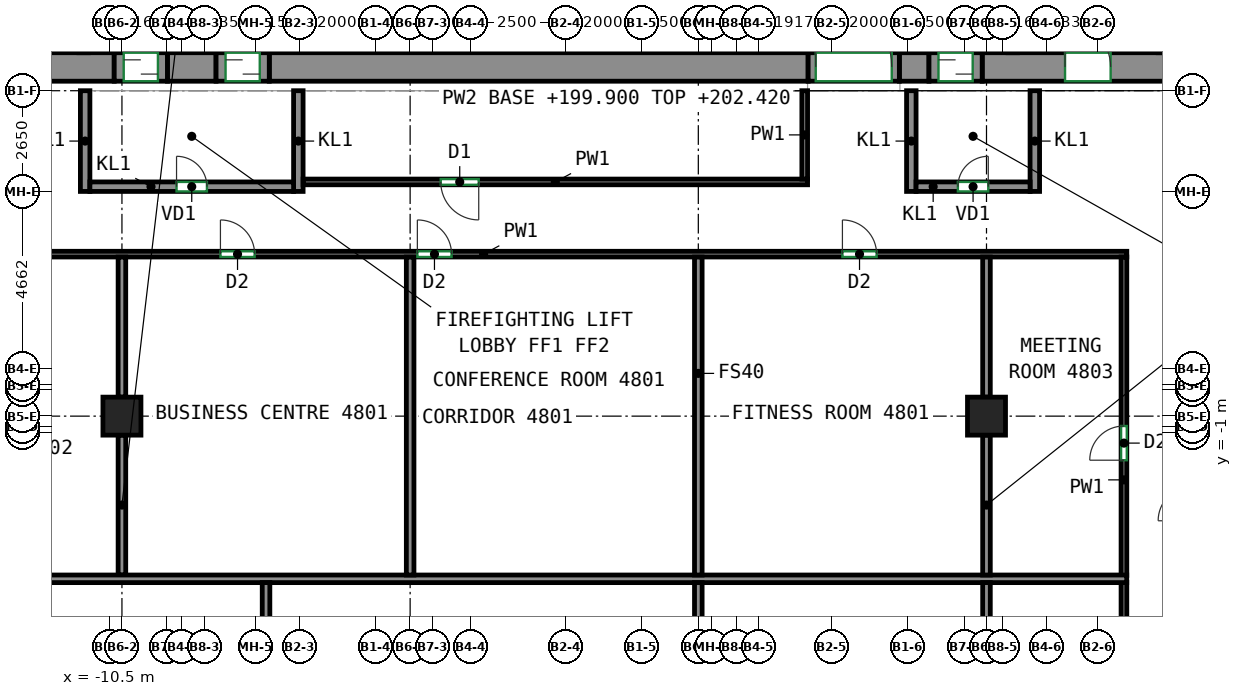
"""IFC4 building model, lengths in metres.
Left out: names, types, materials, properties, quantities, classifications, styles, units other than length and angle.
Written with IfcOpenShell. Run it as: python <this file> out.ifc"""

import sys

from ifc_helpers import new_model, si_unit, direction, frame, frame_2d, origin, origin_2d, place, context, subcontext, project, spatial, rectangle, extrude, source, transform, mapped, element, fill, save


model = new_model("IFC4")
c1 = context("Model", 3, precision=1e-05, world=origin(), true_north=direction((0.0, 1.0)))
c2 = subcontext(c1, "Body", "Model", "MODEL_VIEW")
j1 = project(units=[si_unit("LENGTHUNIT", "METRE"), si_unit("PLANEANGLEUNIT", "RADIAN")], contexts=[c1])
p1 = place(None, origin())
s1 = spatial("IfcSite", under=j1, at=p1, CompositionType="ELEMENT")
p2 = place(p1, origin())
s2 = spatial("IfcBuilding", under=s1, at=p2, CompositionType="ELEMENT")
p3 = place(p2, frame((0.0, 0.0, 199.9)))
s3 = spatial("IfcBuildingStorey", under=s2, at=p3, CompositionType="ELEMENT", Elevation=199.9)
m1 = source(origin(), c2, "Body", "SweptSolid", [
    extrude(rectangle(XDim=1.0, YDim=1.0, at=origin_2d()), origin(), (0.0, 0.0, 1.0), 3.12),
])
for number, where, z_axis, x_axis in (
    (1, (-10.167, -0.562, 0.0), (0.0, 0.0, 1.0), (1.0, 0.0, 0.0)),
    (2, (12.583, -0.562, 0.0), (0.0, 0.0, 1.0), (1.0, 0.0, 0.0)),
):
    element("IfcColumn", number, at=place(p3, frame(where, z_axis=z_axis, x_axis=x_axis)), inside=s3, PredefinedType="COLUMN", context=c2, shape_type="MappedRepresentation", body=[
        mapped(m1, transform((0.0, 0.0, 0.0))),
    ])
m2 = source(origin(), c2, "Body", "SweptSolid", [
    extrude(rectangle(XDim=5.38, YDim=0.75, at=frame_2d((2.69, 0.0))), origin(), (0.0, 0.0, 1.0), 3.12),
])
p4 = place(p3, frame((-15.75, 8.625, 0.0), z_axis=(0.0, 0.0, 1.0), x_axis=(1.0, 0.0, 0.0)))
e3 = element("IfcWall", 3, at=p4, inside=s3, PredefinedType="SHEAR", context=c2, shape_type="MappedRepresentation", body=[
    mapped(m2, transform((0.0, 0.0, 0.0))),
])
p5 = place(p4, frame((2.0, 0.0, 0.0)))
e4 = element("IfcOpeningElement", 4, at=p5, cuts=e3, PredefinedType="OPENING", context=c2, shape_type="SweptSolid", body=[
    extrude(rectangle(XDim=1.2, YDim=2.1, at=frame_2d((0.6, 1.05))), frame((0.0, 0.385, 0.0), z_axis=(0.0, -1.0, 0.0), x_axis=(1.0, 0.0, 0.0)), (0.0, 0.0, 1.0), 0.77),
])
m3 = source(origin(), c2, "Body", "SweptSolid", [
    extrude(rectangle(XDim=1.28, YDim=0.75, at=frame_2d((0.64, 0.0))), origin(), (0.0, 0.0, 1.0), 3.12),
])
p6 = place(p3, frame((-8.97, 8.625, 0.0), z_axis=(0.0, 0.0, 1.0), x_axis=(1.0, 0.0, 0.0)))
e5 = element("IfcWall", 5, at=p6, inside=s3, PredefinedType="SHEAR", context=c2, shape_type="MappedRepresentation", body=[
    mapped(m3, transform((0.0, 0.0, 0.0))),
])
m4 = source(origin(), c2, "Body", "SweptSolid", [
    extrude(rectangle(XDim=14.18, YDim=0.75, at=frame_2d((7.09, 0.0))), origin(), (0.0, 0.0, 1.0), 3.12),
])
p7 = place(p3, frame((-6.29, 8.625, 0.0), z_axis=(0.0, 0.0, 1.0), x_axis=(1.0, 0.0, 0.0)))
e6 = element("IfcWall", 6, at=p7, inside=s3, PredefinedType="SHEAR", context=c2, shape_type="MappedRepresentation", body=[
    mapped(m4, transform((0.0, 0.0, 0.0))),
])
m5 = source(origin(), c2, "Body", "SweptSolid", [
    extrude(rectangle(XDim=0.78, YDim=0.75, at=frame_2d((0.39, 0.0))), origin(), (0.0, 0.0, 1.0), 3.12),
])
p8 = place(p3, frame((10.29, 8.625, 0.0), z_axis=(0.0, 0.0, 1.0), x_axis=(1.0, 0.0, 0.0)))
e7 = element("IfcWall", 7, at=p8, inside=s3, PredefinedType="SHEAR", context=c2, shape_type="MappedRepresentation", body=[
    mapped(m5, transform((0.0, 0.0, 0.0))),
])
m6 = source(origin(), c2, "Body", "SweptSolid", [
    extrude(rectangle(XDim=5.38, YDim=0.75, at=frame_2d((2.69, 0.0))), origin(), (0.0, 0.0, 1.0), 3.12),
])
p9 = place(p3, frame((12.47, 8.625, 0.0), z_axis=(0.0, 0.0, 1.0), x_axis=(1.0, 0.0, 0.0)))
e8 = element("IfcWall", 8, at=p9, inside=s3, PredefinedType="SHEAR", context=c2, shape_type="MappedRepresentation", body=[
    mapped(m6, transform((0.0, 0.0, 0.0))),
])
p10 = place(p9, frame((2.18, 0.0, 0.0)))
e9 = element("IfcOpeningElement", 9, at=p10, cuts=e8, PredefinedType="OPENING", context=c2, shape_type="SweptSolid", body=[
    extrude(rectangle(XDim=1.2, YDim=2.1, at=frame_2d((0.6, 1.05))), frame((0.0, 0.385, 0.0), z_axis=(0.0, -1.0, 0.0), x_axis=(1.0, 0.0, 0.0)), (0.0, 0.0, 1.0), 0.77),
])
m7 = source(origin(), c2, "Body", "SweptSolid", [
    extrude(rectangle(XDim=2.65, YDim=0.25, at=frame_2d((1.325, 0.0))), origin(), (0.0, 0.0, 1.0), 3.12),
])
for number, where, z_axis, x_axis in (
    (10, (-11.135, 5.35, 0.0), (0.0, 0.0, 1.0), (0.0, 1.0, 0.0)),
    (11, (-5.525, 5.35, 0.0), (0.0, 0.0, 1.0), (0.0, 1.0, 0.0)),
):
    element("IfcWall", number, at=place(p3, frame(where, z_axis=z_axis, x_axis=x_axis)), inside=s3, PredefinedType="PARTITIONING", context=c2, shape_type="MappedRepresentation", body=[
        mapped(m7, transform((0.0, 0.0, 0.0))),
    ])
m8 = source(origin(), c2, "Body", "SweptSolid", [
    extrude(rectangle(XDim=5.36, YDim=0.25, at=frame_2d((2.68, 0.0))), origin(), (0.0, 0.0, 1.0), 3.12),
])
p11 = place(p3, frame((-11.01, 5.475, 0.0), z_axis=(0.0, 0.0, 1.0), x_axis=(1.0, 0.0, 0.0)))
e12 = element("IfcWall", 12, at=p11, inside=s3, PredefinedType="PARTITIONING", context=c2, shape_type="MappedRepresentation", body=[
    mapped(m8, transform((0.0, 0.0, 0.0))),
])
p12 = place(p11, frame((2.28, 0.0, 0.0)))
e13 = element("IfcOpeningElement", 13, at=p12, cuts=e12, PredefinedType="OPENING", context=c2, shape_type="SweptSolid", body=[
    extrude(rectangle(XDim=0.8, YDim=2.0, at=frame_2d((0.4, 1.0))), frame((0.0, 0.135, 0.0), z_axis=(0.0, -1.0, 0.0), x_axis=(1.0, 0.0, 0.0)), (0.0, 0.0, 1.0), 0.27),
])
for number, where, z_axis, x_axis in (
    (14, (10.605, 5.35, 0.0), (0.0, 0.0, 1.0), (0.0, 1.0, 0.0)),
    (15, (13.855, 5.35, 0.0), (0.0, 0.0, 1.0), (0.0, 1.0, 0.0)),
):
    element("IfcWall", number, at=place(p3, frame(where, z_axis=z_axis, x_axis=x_axis)), inside=s3, PredefinedType="PARTITIONING", context=c2, shape_type="MappedRepresentation", body=[
        mapped(m7, transform((0.0, 0.0, 0.0))),
    ])
m9 = source(origin(), c2, "Body", "SweptSolid", [
    extrude(rectangle(XDim=3.0, YDim=0.25, at=frame_2d((1.5, 0.0))), origin(), (0.0, 0.0, 1.0), 3.12),
])
p13 = place(p3, frame((10.73, 5.475, 0.0), z_axis=(0.0, 0.0, 1.0), x_axis=(1.0, 0.0, 0.0)))
e16 = element("IfcWall", 16, at=p13, inside=s3, PredefinedType="PARTITIONING", context=c2, shape_type="MappedRepresentation", body=[
    mapped(m9, transform((0.0, 0.0, 0.0))),
])
p14 = place(p13, frame((1.1, 0.0, 0.0)))
e17 = element("IfcOpeningElement", 17, at=p14, cuts=e16, PredefinedType="OPENING", context=c2, shape_type="SweptSolid", body=[
    extrude(rectangle(XDim=0.8, YDim=2.0, at=frame_2d((0.4, 1.0))), frame((0.0, 0.135, 0.0), z_axis=(0.0, -1.0, 0.0), x_axis=(1.0, 0.0, 0.0)), (0.0, 0.0, 1.0), 0.27),
])
m10 = source(origin(), c2, "Body", "SweptSolid", [
    extrude(rectangle(XDim=1.4, YDim=0.75, at=frame_2d((0.7, 0.0))), origin(), (0.0, 0.0, 1.0), 2.7),
])
p15 = place(p3, frame((-10.37, 8.625, 0.0), z_axis=(0.0, 0.0, 1.0), x_axis=(1.0, 0.0, 0.0)))
e18 = element("IfcWall", 18, at=p15, inside=s3, PredefinedType="PARTITIONING", context=c2, shape_type="MappedRepresentation", body=[
    mapped(m10, transform((0.0, 0.0, 0.0))),
])
p16 = place(p15, frame((0.25, 0.0, 0.0)))
e19 = element("IfcOpeningElement", 19, at=p16, cuts=e18, PredefinedType="OPENING", context=c2, shape_type="SweptSolid", body=[
    extrude(rectangle(XDim=0.9, YDim=2.1, at=frame_2d((0.45, 1.05))), frame((0.0, 0.385, 0.0), z_axis=(0.0, -1.0, 0.0), x_axis=(1.0, 0.0, 0.0)), (0.0, 0.0, 1.0), 0.77),
])
m11 = source(origin(), c2, "Body", "SweptSolid", [
    extrude(rectangle(XDim=1.4, YDim=0.75, at=frame_2d((0.7, 0.0))), origin(), (0.0, 0.0, 1.0), 2.7),
])
p17 = place(p3, frame((-7.69, 8.625, 0.0), z_axis=(0.0, 0.0, 1.0), x_axis=(1.0, 0.0, 0.0)))
e20 = element("IfcWall", 20, at=p17, inside=s3, PredefinedType="PARTITIONING", context=c2, shape_type="MappedRepresentation", body=[
    mapped(m11, transform((0.0, 0.0, 0.0))),
])
p18 = place(p17, frame((0.25, 0.0, 0.0)))
e21 = element("IfcOpeningElement", 21, at=p18, cuts=e20, PredefinedType="OPENING", context=c2, shape_type="SweptSolid", body=[
    extrude(rectangle(XDim=0.9, YDim=2.1, at=frame_2d((0.45, 1.05))), frame((0.0, 0.385, 0.0), z_axis=(0.0, -1.0, 0.0), x_axis=(1.0, 0.0, 0.0)), (0.0, 0.0, 1.0), 0.77),
])
m12 = source(origin(), c2, "Body", "SweptSolid", [
    extrude(rectangle(XDim=2.4, YDim=0.75, at=frame_2d((1.2, 0.0))), origin(), (0.0, 0.0, 1.0), 2.7),
])
p19 = place(p3, frame((7.89, 8.625, 0.0), z_axis=(0.0, 0.0, 1.0), x_axis=(1.0, 0.0, 0.0)))
e22 = element("IfcWall", 22, at=p19, inside=s3, PredefinedType="PARTITIONING", context=c2, shape_type="MappedRepresentation", body=[
    mapped(m12, transform((0.0, 0.0, 0.0))),
])
p20 = place(p19, frame((0.2, 0.0, 0.0)))
e23 = element("IfcOpeningElement", 23, at=p20, cuts=e22, PredefinedType="OPENING", context=c2, shape_type="SweptSolid", body=[
    extrude(rectangle(XDim=2.0, YDim=2.1, at=frame_2d((1.0, 1.05))), frame((0.0, 0.385, 0.0), z_axis=(0.0, -1.0, 0.0), x_axis=(1.0, 0.0, 0.0)), (0.0, 0.0, 1.0), 0.77),
])
p21 = place(p3, frame((11.07, 8.625, 0.0), z_axis=(0.0, 0.0, 1.0), x_axis=(1.0, 0.0, 0.0)))
e24 = element("IfcWall", 24, at=p21, inside=s3, PredefinedType="PARTITIONING", context=c2, shape_type="MappedRepresentation", body=[
    mapped(m11, transform((0.0, 0.0, 0.0))),
])
p22 = place(p21, frame((0.25, 0.0, 0.0)))
e25 = element("IfcOpeningElement", 25, at=p22, cuts=e24, PredefinedType="OPENING", context=c2, shape_type="SweptSolid", body=[
    extrude(rectangle(XDim=0.9, YDim=2.1, at=frame_2d((0.45, 1.05))), frame((0.0, 0.385, 0.0), z_axis=(0.0, -1.0, 0.0), x_axis=(1.0, 0.0, 0.0)), (0.0, 0.0, 1.0), 0.77),
])
p23 = place(p3, frame((7.875, 5.6, 0.0), z_axis=(0.0, 0.0, 1.0), x_axis=(-1.0, 0.0, 0.0)))
e26 = element("IfcWall", 26, at=p23, inside=s3, PredefinedType="PARTITIONING", context=c2, shape_type="SweptSolid", body=[
    extrude(rectangle(XDim=13.275, YDim=0.15, at=frame_2d((6.637, 0.0))), origin(), (0.0, 0.0, 1.0), 3.12),
])
p24 = place(p23, frame((8.653, 0.0, 0.0)))
e27 = element("IfcOpeningElement", 27, at=p24, cuts=e26, PredefinedType="OPENING", context=c2, shape_type="SweptSolid", body=[
    extrude(rectangle(XDim=1.0, YDim=2.1, at=frame_2d((0.5, 1.05))), frame((0.0, 0.085, 0.0), z_axis=(0.0, -1.0, 0.0), x_axis=(1.0, 0.0, 0.0)), (0.0, 0.0, 1.0), 0.17),
])
p25 = place(p3, frame((7.8, 8.0, 0.0), z_axis=(0.0, 0.0, 1.0), x_axis=(0.0, -1.0, 0.0)))
e28 = element("IfcWall", 28, at=p25, inside=s3, PredefinedType="PARTITIONING", context=c2, shape_type="SweptSolid", body=[
    extrude(rectangle(XDim=2.325, YDim=0.15, at=frame_2d((1.163, 0.0))), origin(), (0.0, 0.0, 1.0), 3.12),
])
p26 = place(p3, frame((-17.575, 3.7, 0.0), z_axis=(0.0, 0.0, 1.0), x_axis=(1.0, 0.0, 0.0)))
e29 = element("IfcWall", 29, at=p26, inside=s3, PredefinedType="PARTITIONING", context=c2, shape_type="SweptSolid", body=[
    extrude(rectangle(XDim=33.85, YDim=0.15, at=frame_2d((16.925, 0.0))), origin(), (0.0, 0.0, 1.0), 3.12),
])
p27 = place(p26, frame((10.0, 0.0, 0.0)))
e30 = element("IfcOpeningElement", 30, at=p27, cuts=e29, PredefinedType="OPENING", context=c2, shape_type="SweptSolid", body=[
    extrude(rectangle(XDim=0.9, YDim=2.1, at=frame_2d((0.45, 1.05))), frame((0.0, 0.085, 0.0), z_axis=(0.0, -1.0, 0.0), x_axis=(1.0, 0.0, 0.0)), (0.0, 0.0, 1.0), 0.17),
])
p28 = place(p26, frame((15.182, 0.0, 0.0)))
e31 = element("IfcOpeningElement", 31, at=p28, cuts=e29, PredefinedType="OPENING", context=c2, shape_type="SweptSolid", body=[
    extrude(rectangle(XDim=0.9, YDim=2.1, at=frame_2d((0.45, 1.05))), frame((0.0, 0.085, 0.0), z_axis=(0.0, -1.0, 0.0), x_axis=(1.0, 0.0, 0.0)), (0.0, 0.0, 1.0), 0.17),
])
p29 = place(p26, frame((26.367, 0.0, 0.0)))
e32 = element("IfcOpeningElement", 32, at=p29, cuts=e29, PredefinedType="OPENING", context=c2, shape_type="SweptSolid", body=[
    extrude(rectangle(XDim=0.9, YDim=2.1, at=frame_2d((0.45, 1.05))), frame((0.0, 0.085, 0.0), z_axis=(0.0, -1.0, 0.0), x_axis=(1.0, 0.0, 0.0)), (0.0, 0.0, 1.0), 0.17),
])
p30 = place(p3, frame((16.2, -4.753, 0.0), z_axis=(0.0, 0.0, 1.0), x_axis=(0.0, 1.0, 0.0)))
e33 = element("IfcWall", 33, at=p30, inside=s3, PredefinedType="PARTITIONING", context=c2, shape_type="SweptSolid", body=[
    extrude(rectangle(XDim=8.378, YDim=0.15, at=frame_2d((4.189, 0.0))), origin(), (0.0, 0.0, 1.0), 3.12),
])
p31 = place(p30, frame((3.031, 0.0, 0.0)))
e34 = element("IfcOpeningElement", 34, at=p31, cuts=e33, PredefinedType="OPENING", context=c2, shape_type="SweptSolid", body=[
    extrude(rectangle(XDim=0.9, YDim=2.1, at=frame_2d((0.45, 1.05))), frame((0.0, 0.085, 0.0), z_axis=(0.0, -1.0, 0.0), x_axis=(1.0, 0.0, 0.0)), (0.0, 0.0, 1.0), 0.17),
])
p32 = place(p3, frame((16.2, -15.425, 0.0), z_axis=(0.0, 0.0, 1.0), x_axis=(0.0, 1.0, 0.0)))
e35 = element("IfcWall", 35, at=p32, inside=s3, PredefinedType="PARTITIONING", context=c2, shape_type="SweptSolid", body=[
    extrude(rectangle(XDim=10.492, YDim=0.15, at=frame_2d((5.246, 0.0))), origin(), (0.0, 0.0, 1.0), 3.12),
])
p33 = place(p32, frame((3.836, 0.0, 0.0)))
e36 = element("IfcOpeningElement", 36, at=p33, cuts=e35, PredefinedType="OPENING", context=c2, shape_type="SweptSolid", body=[
    extrude(rectangle(XDim=0.9, YDim=2.1, at=frame_2d((0.45, 1.05))), frame((0.0, 0.085, 0.0), z_axis=(0.0, -1.0, 0.0), x_axis=(1.0, 0.0, 0.0)), (0.0, 0.0, 1.0), 0.17),
])
p34 = place(p3, frame((-10.167, -0.062, 0.0), z_axis=(0.0, 0.0, 1.0), x_axis=(0.0, 1.0, 0.0)))
e37 = element("IfcWall", 37, at=p34, inside=s3, PredefinedType="PARTITIONING", context=c2, shape_type="SweptSolid", body=[
    extrude(rectangle(XDim=3.685, YDim=0.2, at=frame_2d((1.843, 0.0))), origin(), (0.0, 0.0, 1.0), 3.12),
])
p35 = place(p3, frame((-10.167, -4.743, 0.0), z_axis=(0.0, 0.0, 1.0), x_axis=(0.0, 1.0, 0.0)))
e38 = element("IfcWall", 38, at=p35, inside=s3, PredefinedType="PARTITIONING", context=c2, shape_type="SweptSolid", body=[
    extrude(rectangle(XDim=3.681, YDim=0.2, at=frame_2d((1.84, 0.0))), origin(), (0.0, 0.0, 1.0), 2.52),
])
p36 = place(p3, frame((-13.873, -4.843, 0.0), z_axis=(0.0, 0.0, 1.0), x_axis=(1.0, 0.0, 0.0)))
e39 = element("IfcWall", 39, at=p36, inside=s3, PredefinedType="PARTITIONING", context=c2, shape_type="SweptSolid", body=[
    extrude(rectangle(XDim=30.146, YDim=0.2, at=frame_2d((15.073, 0.0))), origin(), (0.0, 0.0, 1.0), 3.12),
])
for number, where, z_axis, x_axis in (
    (40, (-2.583, -4.743, 0.0), (0.0, 0.0, 1.0), (0.0, 1.0, 0.0)),
    (41, (5.0, -4.743, 0.0), (0.0, 0.0, 1.0), (0.0, 1.0, 0.0)),
):
    element("IfcWall", number, at=place(p3, frame(where, z_axis=z_axis, x_axis=x_axis)), inside=s3, PredefinedType="PARTITIONING", context=c2, shape_type="SweptSolid", body=[
        extrude(rectangle(XDim=8.366, YDim=0.2, at=frame_2d((4.183, 0.0))), origin(), (0.0, 0.0, 1.0), 3.12),
    ])
p37 = place(p3, frame((12.583, -0.062, 0.0), z_axis=(0.0, 0.0, 1.0), x_axis=(0.0, 1.0, 0.0)))
e42 = element("IfcWall", 42, at=p37, inside=s3, PredefinedType="PARTITIONING", context=c2, shape_type="SweptSolid", body=[
    extrude(rectangle(XDim=3.685, YDim=0.2, at=frame_2d((1.843, 0.0))), origin(), (0.0, 0.0, 1.0), 3.12),
])
p38 = place(p3, frame((12.583, -4.743, 0.0), z_axis=(0.0, 0.0, 1.0), x_axis=(0.0, 1.0, 0.0)))
e43 = element("IfcWall", 43, at=p38, inside=s3, PredefinedType="PARTITIONING", context=c2, shape_type="SweptSolid", body=[
    extrude(rectangle(XDim=3.681, YDim=0.2, at=frame_2d((1.84, 0.0))), origin(), (0.0, 0.0, 1.0), 2.52),
])
for number, where, z_axis, x_axis in (
    (44, (-6.375, -15.423, 0.0), (0.0, 0.0, 1.0), (0.0, 1.0, 0.0)),
    (45, (5.0, -15.423, 0.0), (0.0, 0.0, 1.0), (0.0, 1.0, 0.0)),
):
    element("IfcWall", number, at=place(p3, frame(where, z_axis=z_axis, x_axis=x_axis)), inside=s3, PredefinedType="PARTITIONING", context=c2, shape_type="SweptSolid", body=[
        extrude(rectangle(XDim=10.48, YDim=0.2, at=frame_2d((5.24, 0.0))), origin(), (0.0, 0.0, 1.0), 3.12),
    ])
p39 = place(p3, frame((12.583, -8.625, 0.0), z_axis=(0.0, 0.0, 1.0), x_axis=(0.0, 1.0, 0.0)))
e46 = element("IfcWall", 46, at=p39, inside=s3, PredefinedType="PARTITIONING", context=c2, shape_type="SweptSolid", body=[
    extrude(rectangle(XDim=3.682, YDim=0.2, at=frame_2d((1.841, 0.0))), origin(), (0.0, 0.0, 1.0), 2.52),
])
p40 = place(p20, origin())
e47 = element("IfcDoor", 47, at=p40, inside=s3, OperationType="DOUBLE_DOOR_SINGLE_SWING", PredefinedType="DOOR", context=c2, shape_type="SweptSolid", body=[
    extrude(rectangle(XDim=2.0, YDim=2.1, at=frame_2d((1.0, 1.05))), frame((0.0, 0.28, 0.0), z_axis=(0.0, -1.0, 0.0), x_axis=(1.0, 0.0, 0.0)), (0.0, 0.0, 1.0), 0.05),
])
fill(e23, e47)
p41 = place(p12, origin())
e48 = element("IfcDoor", 48, at=p41, inside=s3, OperationType="SINGLE_SWING_LEFT", PredefinedType="DOOR", context=c2, shape_type="SweptSolid", body=[
    extrude(rectangle(XDim=0.8, YDim=2.0, at=frame_2d((0.4, 1.0))), frame((0.0, 0.025, 0.0), z_axis=(0.0, -1.0, 0.0), x_axis=(1.0, 0.0, 0.0)), (0.0, 0.0, 1.0), 0.05),
])
fill(e13, e48)
p42 = place(p14, origin())
e49 = element("IfcDoor", 49, at=p42, inside=s3, OperationType="SINGLE_SWING_RIGHT", PredefinedType="DOOR", context=c2, shape_type="SweptSolid", body=[
    extrude(rectangle(XDim=0.8, YDim=2.0, at=frame_2d((0.4, 1.0))), frame((0.0, 0.025, 0.0), z_axis=(0.0, -1.0, 0.0), x_axis=(1.0, 0.0, 0.0)), (0.0, 0.0, 1.0), 0.05),
])
fill(e17, e49)
p43 = place(p16, origin())
e50 = element("IfcDoor", 50, at=p43, inside=s3, OperationType="SLIDING_TO_LEFT", PredefinedType="DOOR", context=c2, shape_type="SweptSolid", body=[
    extrude(rectangle(XDim=0.9, YDim=2.1, at=frame_2d((0.45, 1.05))), frame((0.0, 0.28, 0.0), z_axis=(0.0, -1.0, 0.0), x_axis=(1.0, 0.0, 0.0)), (0.0, 0.0, 1.0), 0.05),
])
fill(e19, e50)
p44 = place(p18, origin())
e51 = element("IfcDoor", 51, at=p44, inside=s3, OperationType="SLIDING_TO_RIGHT", PredefinedType="DOOR", context=c2, shape_type="SweptSolid", body=[
    extrude(rectangle(XDim=0.9, YDim=2.1, at=frame_2d((0.45, 1.05))), frame((0.0, 0.28, 0.0), z_axis=(0.0, -1.0, 0.0), x_axis=(1.0, 0.0, 0.0)), (0.0, 0.0, 1.0), 0.05),
])
fill(e21, e51)
p45 = place(p22, origin())
e52 = element("IfcDoor", 52, at=p45, inside=s3, OperationType="SLIDING_TO_LEFT", PredefinedType="DOOR", context=c2, shape_type="SweptSolid", body=[
    extrude(rectangle(XDim=0.9, YDim=2.1, at=frame_2d((0.45, 1.05))), frame((0.0, 0.28, 0.0), z_axis=(0.0, -1.0, 0.0), x_axis=(1.0, 0.0, 0.0)), (0.0, 0.0, 1.0), 0.05),
])
fill(e25, e52)
p46 = place(p10, origin())
e53 = element("IfcDoor", 53, at=p46, inside=s3, OperationType="DOUBLE_DOOR_SINGLE_SWING", PredefinedType="DOOR", context=c2, shape_type="SweptSolid", body=[
    extrude(rectangle(XDim=1.2, YDim=2.1, at=frame_2d((0.6, 1.05))), frame((0.0, 0.28, 0.0), z_axis=(0.0, -1.0, 0.0), x_axis=(1.0, 0.0, 0.0)), (0.0, 0.0, 1.0), 0.05),
])
fill(e9, e53)
p47 = place(p31, origin())
e54 = element("IfcDoor", 54, at=p47, inside=s3, OperationType="SINGLE_SWING_LEFT", PredefinedType="DOOR", context=c2, shape_type="SweptSolid", body=[
    extrude(rectangle(XDim=0.9, YDim=2.1, at=frame_2d((0.45, 1.05))), frame((0.0, 0.025, 0.0), z_axis=(0.0, -1.0, 0.0), x_axis=(1.0, 0.0, 0.0)), (0.0, 0.0, 1.0), 0.05),
])
fill(e34, e54)
p48 = place(p27, origin())
e55 = element("IfcDoor", 55, at=p48, inside=s3, OperationType="SINGLE_SWING_LEFT", PredefinedType="DOOR", context=c2, shape_type="SweptSolid", body=[
    extrude(rectangle(XDim=0.9, YDim=2.1, at=frame_2d((0.45, 1.05))), frame((0.0, 0.025, 0.0), z_axis=(0.0, -1.0, 0.0), x_axis=(1.0, 0.0, 0.0)), (0.0, 0.0, 1.0), 0.05),
])
fill(e30, e55)
p49 = place(p28, origin())
e56 = element("IfcDoor", 56, at=p49, inside=s3, OperationType="SINGLE_SWING_LEFT", PredefinedType="DOOR", context=c2, shape_type="SweptSolid", body=[
    extrude(rectangle(XDim=0.9, YDim=2.1, at=frame_2d((0.45, 1.05))), frame((0.0, 0.025, 0.0), z_axis=(0.0, -1.0, 0.0), x_axis=(1.0, 0.0, 0.0)), (0.0, 0.0, 1.0), 0.05),
])
fill(e31, e56)
p50 = place(p29, origin())
e57 = element("IfcDoor", 57, at=p50, inside=s3, OperationType="SINGLE_SWING_LEFT", PredefinedType="DOOR", context=c2, shape_type="SweptSolid", body=[
    extrude(rectangle(XDim=0.9, YDim=2.1, at=frame_2d((0.45, 1.05))), frame((0.0, 0.025, 0.0), z_axis=(0.0, -1.0, 0.0), x_axis=(1.0, 0.0, 0.0)), (0.0, 0.0, 1.0), 0.05),
])
fill(e32, e57)
p51 = place(p24, origin())
e58 = element("IfcDoor", 58, at=p51, inside=s3, OperationType="SINGLE_SWING_LEFT", PredefinedType="DOOR", context=c2, shape_type="SweptSolid", body=[
    extrude(rectangle(XDim=1.0, YDim=2.1, at=frame_2d((0.5, 1.05))), frame((0.0, 0.025, 0.0), z_axis=(0.0, -1.0, 0.0), x_axis=(1.0, 0.0, 0.0)), (0.0, 0.0, 1.0), 0.05),
])
fill(e27, e58)
save(model, sys.argv[1])
